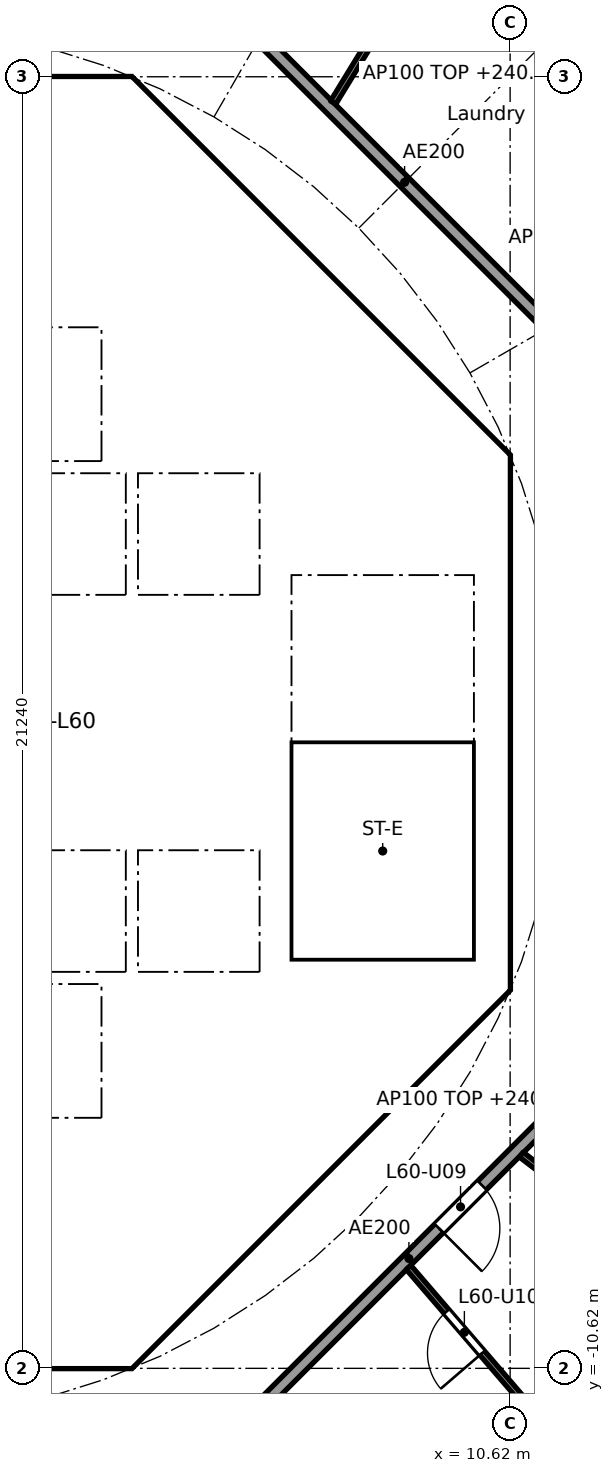
"""IFC4 building model, lengths in metres.
Left out: names, types, materials, properties, quantities, classifications, styles, units other than length and angle.
Written with IfcOpenShell. Run it as: python <this file> out.ifc"""

import sys

from ifc_helpers import new_model, si_unit, direction, frame, frame_2d, origin, place, context, subcontext, project, spatial, polyline, rectangle, outline, extrude, element, fill, save


model = new_model("IFC4")
c1 = context("Model", 3, precision=1e-05, world=origin(), true_north=direction((0.0, 1.0)))
c2 = subcontext(c1, "Body", "Model", "MODEL_VIEW")
j1 = project(units=[si_unit("LENGTHUNIT", "METRE"), si_unit("PLANEANGLEUNIT", "RADIAN")], contexts=[c1])
p1 = place(None, origin())
s1 = spatial("IfcSite", under=j1, at=p1, CompositionType="ELEMENT")
p2 = place(p1, origin())
s2 = spatial("IfcBuilding", under=s1, at=p2, CompositionType="ELEMENT")
p3 = place(p2, frame((0.0, 0.0, 238.1)))
s3 = spatial("IfcBuildingStorey", under=s2, at=p3, CompositionType="ELEMENT", Elevation=238.1)
p4 = place(p3, frame((9.988, 4.613, 0.0), z_axis=(0.0, 0.0, 1.0), x_axis=(-0.707106781187, 0.707106781187, 0.0)))
e1 = element("IfcWall", 1, at=p4, inside=s3, PredefinedType="SHEAR", context=c2, shape_type="SweptSolid", body=[
    extrude(rectangle(XDim=7.602, YDim=0.6, at=frame_2d((3.801, 0.0))), origin(), (0.0, 0.0, 1.0), 3.44),
])
p5 = place(p4, frame((3.201, 0.0, 0.0)))
e2 = element("IfcOpeningElement", 2, at=p5, cuts=e1, PredefinedType="OPENING", context=c2, shape_type="SweptSolid", body=[
    extrude(rectangle(XDim=1.2, YDim=2.1, at=frame_2d((0.6, 1.05))), frame((0.0, 0.31, 0.0), z_axis=(0.0, -1.0, 0.0), x_axis=(1.0, 0.0, 0.0)), (0.0, 0.0, 1.0), 0.62),
])
p6 = place(p3, frame((4.613, -9.988, 0.0), z_axis=(0.0, 0.0, 1.0), x_axis=(0.707106781187, 0.707106781187, 0.0)))
e3 = element("IfcWall", 3, at=p6, inside=s3, PredefinedType="SHEAR", context=c2, shape_type="SweptSolid", body=[
    extrude(rectangle(XDim=7.602, YDim=0.6, at=frame_2d((3.801, 0.0))), origin(), (0.0, 0.0, 1.0), 3.44),
])
p7 = place(p6, frame((3.201, 0.0, 0.0)))
e4 = element("IfcOpeningElement", 4, at=p7, cuts=e3, PredefinedType="OPENING", context=c2, shape_type="SweptSolid", body=[
    extrude(rectangle(XDim=1.2, YDim=2.1, at=frame_2d((0.6, 1.05))), frame((0.0, 0.31, 0.0), z_axis=(0.0, -1.0, 0.0), x_axis=(1.0, 0.0, 0.0)), (0.0, 0.0, 1.0), 0.62),
])
p8 = place(p3, frame((4.0, 4.3, 0.0), z_axis=(0.0, 0.0, 1.0), x_axis=(0.0, 1.0, 0.0)))
e5 = element("IfcWall", 5, at=p8, inside=s3, PredefinedType="SOLIDWALL", context=c2, shape_type="SweptSolid", body=[
    extrude(rectangle(XDim=2.2, YDim=0.2, at=frame_2d((1.1, 0.0))), origin(), (0.0, 0.0, 1.0), 3.44),
])
p9 = place(p8, frame((0.55, 0.0, 0.0)))
e6 = element("IfcOpeningElement", 6, at=p9, cuts=e5, PredefinedType="OPENING", context=c2, shape_type="SweptSolid", body=[
    extrude(rectangle(XDim=1.1, YDim=2.1, at=frame_2d((0.55, 1.05))), frame((0.0, 0.11, 0.0), z_axis=(0.0, -1.0, 0.0), x_axis=(1.0, 0.0, 0.0)), (0.0, 0.0, 1.0), 0.22),
])
p10 = place(p3, frame((-6.7, 2.0, 0.0), z_axis=(0.0, 0.0, 1.0), x_axis=(1.0, 0.0, 0.0)))
e7 = element("IfcWall", 7, at=p10, inside=s3, PredefinedType="SOLIDWALL", context=c2, shape_type="SweptSolid", body=[
    extrude(rectangle(XDim=13.4, YDim=0.2, at=frame_2d((6.7, 0.0))), origin(), (0.0, 0.0, 1.0), 3.44),
])
p11 = place(p10, frame((7.25, 0.0, 0.0)))
e8 = element("IfcOpeningElement", 8, at=p11, cuts=e7, PredefinedType="OPENING", context=c2, shape_type="SweptSolid", body=[
    extrude(rectangle(XDim=1.1, YDim=2.1, at=frame_2d((0.55, 1.05))), frame((0.0, 0.11, 0.0), z_axis=(0.0, -1.0, 0.0), x_axis=(1.0, 0.0, 0.0)), (0.0, 0.0, 1.0), 0.22),
])
p12 = place(p10, frame((9.45, 0.0, 0.0)))
e9 = element("IfcOpeningElement", 9, at=p12, cuts=e7, PredefinedType="OPENING", context=c2, shape_type="SweptSolid", body=[
    extrude(rectangle(XDim=1.1, YDim=2.1, at=frame_2d((0.55, 1.05))), frame((0.0, 0.11, 0.0), z_axis=(0.0, -1.0, 0.0), x_axis=(1.0, 0.0, 0.0)), (0.0, 0.0, 1.0), 0.22),
])
p13 = place(p10, frame((2.95, 0.0, 0.0)))
e10 = element("IfcOpeningElement", 10, at=p13, cuts=e7, PredefinedType="OPENING", context=c2, shape_type="SweptSolid", body=[
    extrude(rectangle(XDim=0.9, YDim=2.1, at=frame_2d((0.45, 1.05))), frame((0.0, 0.11, 0.0), z_axis=(0.0, -1.0, 0.0), x_axis=(1.0, 0.0, 0.0)), (0.0, 0.0, 1.0), 0.22),
])
p14 = place(p3, frame((6.7, 4.0, 0.0), z_axis=(0.0, 0.0, 1.0), x_axis=(1.0, 0.0, 0.0)))
e11 = element("IfcWall", 11, at=p14, inside=s3, PredefinedType="SOLIDWALL", context=c2, shape_type="SweptSolid", body=[
    extrude(rectangle(XDim=3.325, YDim=0.2, at=frame_2d((1.662, 0.0))), origin(), (0.0, 0.0, 1.0), 3.44),
])
p15 = place(p14, frame((1.25, 0.0, 0.0)))
e12 = element("IfcOpeningElement", 12, at=p15, cuts=e11, PredefinedType="OPENING", context=c2, shape_type="SweptSolid", body=[
    extrude(rectangle(XDim=1.1, YDim=2.1, at=frame_2d((0.55, 1.05))), frame((0.0, 0.11, 0.0), z_axis=(0.0, -1.0, 0.0), x_axis=(1.0, 0.0, 0.0)), (0.0, 0.0, 1.0), 0.22),
])
p16 = place(p3, frame((4.0, 7.025, 0.0), z_axis=(0.0, 0.0, 1.0), x_axis=(0.0, 1.0, 0.0)))
e13 = element("IfcWall", 13, at=p16, inside=s3, PredefinedType="SOLIDWALL", context=c2, shape_type="SweptSolid", body=[
    extrude(rectangle(XDim=3.0, YDim=0.2, at=frame_2d((1.5, 0.0))), origin(), (0.0, 0.0, 1.0), 3.44),
])
p17 = place(p16, frame((0.925, 0.0, 0.0)))
e14 = element("IfcOpeningElement", 14, at=p17, cuts=e13, PredefinedType="OPENING", context=c2, shape_type="SweptSolid", body=[
    extrude(rectangle(XDim=1.1, YDim=2.1, at=frame_2d((0.55, 1.05))), frame((0.0, 0.11, 0.0), z_axis=(0.0, -1.0, 0.0), x_axis=(1.0, 0.0, 0.0)), (0.0, 0.0, 1.0), 0.22),
])
p18 = place(p3, frame((4.0, -10.025, 0.0), z_axis=(0.0, 0.0, 1.0), x_axis=(0.0, 1.0, 0.0)))
e15 = element("IfcWall", 15, at=p18, inside=s3, PredefinedType="SOLIDWALL", context=c2, shape_type="SweptSolid", body=[
    extrude(rectangle(XDim=3.0, YDim=0.2, at=frame_2d((1.5, 0.0))), origin(), (0.0, 0.0, 1.0), 3.44),
])
p19 = place(p18, frame((0.975, 0.0, 0.0)))
e16 = element("IfcOpeningElement", 16, at=p19, cuts=e15, PredefinedType="OPENING", context=c2, shape_type="SweptSolid", body=[
    extrude(rectangle(XDim=1.1, YDim=2.1, at=frame_2d((0.55, 1.05))), frame((0.0, 0.11, 0.0), z_axis=(0.0, -1.0, 0.0), x_axis=(1.0, 0.0, 0.0)), (0.0, 0.0, 1.0), 0.22),
])
p20 = place(p3, frame((4.0, -6.5, 0.0), z_axis=(0.0, 0.0, 1.0), x_axis=(0.0, 1.0, 0.0)))
e17 = element("IfcWall", 17, at=p20, inside=s3, PredefinedType="SOLIDWALL", context=c2, shape_type="SweptSolid", body=[
    extrude(rectangle(XDim=2.2, YDim=0.2, at=frame_2d((1.1, 0.0))), origin(), (0.0, 0.0, 1.0), 3.44),
])
p21 = place(p20, frame((0.55, 0.0, 0.0)))
e18 = element("IfcOpeningElement", 18, at=p21, cuts=e17, PredefinedType="OPENING", context=c2, shape_type="SweptSolid", body=[
    extrude(rectangle(XDim=1.1, YDim=2.1, at=frame_2d((0.55, 1.05))), frame((0.0, 0.11, 0.0), z_axis=(0.0, -1.0, 0.0), x_axis=(1.0, 0.0, 0.0)), (0.0, 0.0, 1.0), 0.22),
])
p22 = place(p3, frame((-6.7, -2.0, 0.0), z_axis=(0.0, 0.0, 1.0), x_axis=(1.0, 0.0, 0.0)))
e19 = element("IfcWall", 19, at=p22, inside=s3, PredefinedType="SOLIDWALL", context=c2, shape_type="SweptSolid", body=[
    extrude(rectangle(XDim=13.4, YDim=0.2, at=frame_2d((6.7, 0.0))), origin(), (0.0, 0.0, 1.0), 3.44),
])
p23 = place(p22, frame((5.05, 0.0, 0.0)))
e20 = element("IfcOpeningElement", 20, at=p23, cuts=e19, PredefinedType="OPENING", context=c2, shape_type="SweptSolid", body=[
    extrude(rectangle(XDim=1.1, YDim=2.1, at=frame_2d((0.55, 1.05))), frame((0.0, 0.11, 0.0), z_axis=(0.0, -1.0, 0.0), x_axis=(1.0, 0.0, 0.0)), (0.0, 0.0, 1.0), 0.22),
])
p24 = place(p22, frame((7.25, 0.0, 0.0)))
e21 = element("IfcOpeningElement", 21, at=p24, cuts=e19, PredefinedType="OPENING", context=c2, shape_type="SweptSolid", body=[
    extrude(rectangle(XDim=1.1, YDim=2.1, at=frame_2d((0.55, 1.05))), frame((0.0, 0.11, 0.0), z_axis=(0.0, -1.0, 0.0), x_axis=(1.0, 0.0, 0.0)), (0.0, 0.0, 1.0), 0.22),
])
p25 = place(p22, frame((0.75, 0.0, 0.0)))
e22 = element("IfcOpeningElement", 22, at=p25, cuts=e19, PredefinedType="OPENING", context=c2, shape_type="SweptSolid", body=[
    extrude(rectangle(XDim=0.9, YDim=2.1, at=frame_2d((0.45, 1.05))), frame((0.0, 0.11, 0.0), z_axis=(0.0, -1.0, 0.0), x_axis=(1.0, 0.0, 0.0)), (0.0, 0.0, 1.0), 0.22),
])
p26 = place(p22, frame((2.95, 0.0, 0.0)))
e23 = element("IfcOpeningElement", 23, at=p26, cuts=e19, PredefinedType="OPENING", context=c2, shape_type="SweptSolid", body=[
    extrude(rectangle(XDim=0.9, YDim=2.1, at=frame_2d((0.45, 1.05))), frame((0.0, 0.11, 0.0), z_axis=(0.0, -1.0, 0.0), x_axis=(1.0, 0.0, 0.0)), (0.0, 0.0, 1.0), 0.22),
])
p27 = place(p3, origin())
e24 = element("IfcWall", 24, at=p27, inside=s3, PredefinedType="SHEAR", context=c2, shape_type="SweptSolid", body=[
    extrude(outline(polyline([(-4.152, -10.025), (4.152, -10.025), (4.401, -9.776), (4.825, -10.2), (4.401, -10.625), (-4.401, -10.625), (-4.825, -10.2), (-4.401, -9.776), (-4.152, -10.025)])), origin(), (0.0, 0.0, 1.0), 3.44),
])
p28 = place(p3, origin())
e25 = element("IfcWall", 25, at=p28, inside=s3, PredefinedType="SHEAR", context=c2, shape_type="SweptSolid", body=[
    extrude(outline(polyline([(-4.152, 10.025), (-4.401, 9.776), (-4.825, 10.2), (-4.401, 10.625), (4.401, 10.625), (4.825, 10.2), (4.401, 9.776), (4.152, 10.025), (-4.152, 10.025)])), origin(), (0.0, 0.0, 1.0), 3.44),
])
p29 = place(p3, origin())
e26 = element("IfcWall", 26, at=p29, inside=s3, PredefinedType="SHEAR", context=c2, shape_type="SweptSolid", body=[
    extrude(outline(polyline([(9.776, -4.401), (10.025, -4.152), (10.025, -3.801), (10.025, 4.152), (9.776, 4.401), (10.2, 4.825), (10.625, 4.401), (10.625, -4.401), (10.2, -4.825), (9.776, -4.401)])), origin(), (0.0, 0.0, 1.0), 3.44),
])
p30 = place(p3, origin())
e27 = element("IfcWall", 27, at=p30, inside=s3, PredefinedType="SOLIDWALL", context=c2, shape_type="SweptSolid", body=[
    extrude(outline(polyline([(-6.7, -2.1), (-6.5, -2.1), (-6.5, -4.1), (-4.5, -4.1), (-4.5, -2.1), (-4.3, -2.1), (-4.3, -4.1), (-2.3, -4.1), (-2.3, -2.1), (-2.1, -2.1), (-2.1, -4.1), (-0.1, -4.1), (-0.1, -2.1), (0.1, -2.1), (0.1, -4.1), (2.1, -4.1), (2.1, -2.1), (2.3, -2.1), (2.3, -4.1), (4.3, -4.1), (4.3, -2.1), (4.5, -2.1), (4.5, -4.1), (6.5, -4.1), (6.5, -2.1), (6.7, -2.1), (6.7, -4.3), (-6.7, -4.3), (-6.7, -2.1)])), origin(), (0.0, 0.0, 1.0), 3.44),
])
p31 = place(p3, origin())
e28 = element("IfcWall", 28, at=p31, inside=s3, PredefinedType="SOLIDWALL", context=c2, shape_type="SweptSolid", body=[
    extrude(outline(polyline([(-6.7, 4.3), (6.7, 4.3), (6.7, 2.1), (6.5, 2.1), (6.5, 4.1), (4.5, 4.1), (4.5, 2.1), (4.3, 2.1), (4.3, 4.1), (2.3, 4.1), (2.3, 2.1), (2.1, 2.1), (2.1, 4.1), (0.1, 4.1), (0.1, 2.1), (-0.1, 2.1), (-0.1, 4.1), (-6.5, 4.1), (-6.5, 2.1), (-6.7, 2.1), (-6.7, 4.3)])), origin(), (0.0, 0.0, 1.0), 3.44),
])
p32 = place(p3, origin())
e29 = element("IfcWall", 29, at=p32, inside=s3, PredefinedType="SOLIDWALL", context=c2, shape_type="SweptSolid", body=[
    extrude(outline(polyline([(4.1, -7.025), (-4.1, -7.025), (-4.1, -6.5), (4.1, -6.5), (4.1, -7.025)])), origin(), (0.0, 0.0, 1.0), 3.44),
])
p33 = place(p3, origin())
e30 = element("IfcWall", 30, at=p33, inside=s3, PredefinedType="SOLIDWALL", context=c2, shape_type="SweptSolid", body=[
    extrude(outline(polyline([(4.1, 6.5), (-4.1, 6.5), (-4.1, 7.025), (4.1, 7.025), (4.1, 6.5)])), origin(), (0.0, 0.0, 1.0), 3.44),
])
p34 = place(p3, origin())
e31 = element("IfcWall", 31, at=p34, inside=s3, PredefinedType="SOLIDWALL", context=c2, shape_type="SweptSolid", body=[
    extrude(outline(polyline([(7.025, -3.9), (6.7, -3.9), (6.7, 3.9), (7.025, 3.9), (7.025, -3.9)])), origin(), (0.0, 0.0, 1.0), 3.44),
])
p35 = place(p3, origin())
e32 = element("IfcWall", 32, at=p35, inside=s3, PredefinedType="SOLIDWALL", context=c2, shape_type="SweptSolid", body=[
    extrude(outline(polyline([(10.025, -4.1), (6.7, -4.1), (6.7, -3.9), (10.025, -3.9), (10.025, -4.1)])), origin(), (0.0, 0.0, 1.0), 3.44),
])
p36 = place(p3, frame((12.635, 5.134, 0.0), z_axis=(0.0, 0.0, 1.0), x_axis=(-0.707106781187, 0.707106781187, 0.0)))
e33 = element("IfcWall", 33, at=p36, inside=s3, PredefinedType="PARTITIONING", context=c2, shape_type="SweptSolid", body=[
    extrude(rectangle(XDim=10.609, YDim=0.2, at=frame_2d((5.305, 0.0))), origin(), (0.0, 0.0, 1.0), 3.44),
])
p37 = place(p3, frame((5.275, -12.494, 0.0), z_axis=(0.0, 0.0, 1.0), x_axis=(0.707106781187, 0.707106781187, 0.0)))
e34 = element("IfcWall", 34, at=p37, inside=s3, PredefinedType="PARTITIONING", context=c2, shape_type="SweptSolid", body=[
    extrude(rectangle(XDim=10.409, YDim=0.2, at=frame_2d((5.205, 0.0))), origin(), (0.0, 0.0, 1.0), 3.44),
])
p38 = place(p37, frame((5.906, 0.0, 0.0)))
e35 = element("IfcOpeningElement", 35, at=p38, cuts=e34, PredefinedType="OPENING", context=c2, shape_type="SweptSolid", body=[
    extrude(rectangle(XDim=1.0, YDim=2.1, at=frame_2d((0.5, 1.05))), frame((0.0, 0.11, 0.0), z_axis=(0.0, -1.0, 0.0), x_axis=(1.0, 0.0, 0.0)), (0.0, 0.0, 1.0), 0.22),
])
p39 = place(p3, frame((12.759, 10.443, 0.0), z_axis=(0.0, 0.0, 1.0), x_axis=(-0.642225196965, 0.766516011825, 0.0)))
e36 = element("IfcWall", 36, at=p39, inside=s3, PredefinedType="PARTITIONING", context=c2, shape_type="SweptSolid", body=[
    extrude(rectangle(XDim=4.361, YDim=0.1, at=frame_2d((2.18, 0.0))), origin(), (0.0, 0.0, 1.0), 2.837),
])
p40 = place(p39, frame((1.73, 0.0, 0.0)))
e37 = element("IfcOpeningElement", 37, at=p40, cuts=e36, PredefinedType="OPENING", context=c2, shape_type="SweptSolid", body=[
    extrude(rectangle(XDim=0.9, YDim=2.1, at=frame_2d((0.45, 1.05))), frame((0.0, 0.06, 0.0), z_axis=(0.0, -1.0, 0.0), x_axis=(1.0, 0.0, 0.0)), (0.0, 0.0, 1.0), 0.12),
])
p41 = place(p3, frame((7.71, 10.197, 0.0), z_axis=(0.0, 0.0, 1.0), x_axis=(0.521477621335, 0.853264959111, 0.0)))
e38 = element("IfcWall", 38, at=p41, inside=s3, PredefinedType="PARTITIONING", context=c2, shape_type="SweptSolid", body=[
    extrude(rectangle(XDim=8.941, YDim=0.1, at=frame_2d((4.471, 0.0))), origin(), (0.0, 0.0, 1.0), 2.762),
])
p42 = place(p41, frame((6.121, 0.0, 0.0)))
e39 = element("IfcOpeningElement", 39, at=p42, cuts=e38, PredefinedType="OPENING", context=c2, shape_type="SweptSolid", body=[
    extrude(rectangle(XDim=0.9, YDim=2.1, at=frame_2d((0.45, 1.05))), frame((0.0, 0.06, 0.0), z_axis=(0.0, -1.0, 0.0), x_axis=(1.0, 0.0, 0.0)), (0.0, 0.0, 1.0), 0.12),
])
p43 = place(p3, frame((8.95, -8.96, 0.0), z_axis=(0.0, 0.0, 1.0), x_axis=(0.652098047064, -0.758134643065, 0.0)))
e40 = element("IfcWall", 40, at=p43, inside=s3, PredefinedType="PARTITIONING", context=c2, shape_type="SweptSolid", body=[
    extrude(rectangle(XDim=5.874, YDim=0.1, at=frame_2d((2.937, 0.0))), origin(), (0.0, 0.0, 1.0), 2.762),
])
p44 = place(p43, frame((0.957, 0.0, 0.0)))
e41 = element("IfcOpeningElement", 41, at=p44, cuts=e40, PredefinedType="OPENING", context=c2, shape_type="SweptSolid", body=[
    extrude(rectangle(XDim=0.9, YDim=2.1, at=frame_2d((0.45, 1.05))), frame((0.0, 0.06, 0.0), z_axis=(0.0, -1.0, 0.0), x_axis=(1.0, 0.0, 0.0)), (0.0, 0.0, 1.0), 0.12),
])
p45 = place(p43, frame((3.894, 0.0, 0.0)))
e42 = element("IfcOpeningElement", 42, at=p45, cuts=e40, PredefinedType="OPENING", context=c2, shape_type="SweptSolid", body=[
    extrude(rectangle(XDim=0.9, YDim=2.1, at=frame_2d((0.45, 1.05))), frame((0.0, 0.06, 0.0), z_axis=(0.0, -1.0, 0.0), x_axis=(1.0, 0.0, 0.0)), (0.0, 0.0, 1.0), 0.12),
])
p46 = place(p3, frame((10.804, -7.105, 0.0), z_axis=(0.0, 0.0, 1.0), x_axis=(0.793311502848, -0.608815948747, 0.0)))
e43 = element("IfcWall", 43, at=p46, inside=s3, PredefinedType="PARTITIONING", context=c2, shape_type="SweptSolid", body=[
    extrude(rectangle(XDim=2.52, YDim=0.1, at=frame_2d((1.26, 0.0))), origin(), (0.0, 0.0, 1.0), 2.762),
])
p47 = place(p46, frame((0.81, 0.0, 0.0)))
e44 = element("IfcOpeningElement", 44, at=p47, cuts=e43, PredefinedType="OPENING", context=c2, shape_type="SweptSolid", body=[
    extrude(rectangle(XDim=0.9, YDim=2.1, at=frame_2d((0.45, 1.05))), frame((0.0, 0.06, 0.0), z_axis=(0.0, -1.0, 0.0), x_axis=(1.0, 0.0, 0.0)), (0.0, 0.0, 1.0), 0.12),
])
p48 = place(p12, origin())
e45 = element("IfcDoor", 45, at=p48, inside=s3, OperationType="DOUBLE_DOOR_SLIDING", PredefinedType="DOOR", context=c2, shape_type="SweptSolid", body=[
    extrude(rectangle(XDim=1.1, YDim=2.1, at=frame_2d((0.55, 1.05))), frame((0.0, 0.025, 0.0), z_axis=(0.0, -1.0, 0.0), x_axis=(1.0, 0.0, 0.0)), (0.0, 0.0, 1.0), 0.05),
])
fill(e9, e45)
p49 = place(p9, origin())
e46 = element("IfcDoor", 46, at=p49, inside=s3, OperationType="DOUBLE_DOOR_SLIDING", PredefinedType="DOOR", context=c2, shape_type="SweptSolid", body=[
    extrude(rectangle(XDim=1.1, YDim=2.1, at=frame_2d((0.55, 1.05))), frame((0.0, 0.025, 0.0), z_axis=(0.0, -1.0, 0.0), x_axis=(1.0, 0.0, 0.0)), (0.0, 0.0, 1.0), 0.05),
])
fill(e6, e46)
p50 = place(p21, origin())
e47 = element("IfcDoor", 47, at=p50, inside=s3, OperationType="DOUBLE_DOOR_SLIDING", PredefinedType="DOOR", context=c2, shape_type="SweptSolid", body=[
    extrude(rectangle(XDim=1.1, YDim=2.1, at=frame_2d((0.55, 1.05))), frame((0.0, 0.025, 0.0), z_axis=(0.0, -1.0, 0.0), x_axis=(1.0, 0.0, 0.0)), (0.0, 0.0, 1.0), 0.05),
])
fill(e18, e47)
p51 = place(p15, frame((1.1, 0.0, 0.0), x_axis=(-1.0, 0.0, 0.0)))
e48 = element("IfcDoor", 48, at=p51, inside=s3, OperationType="SINGLE_SWING_RIGHT", PredefinedType="DOOR", context=c2, shape_type="SweptSolid", body=[
    extrude(rectangle(XDim=1.1, YDim=2.1, at=frame_2d((0.55, 1.05))), frame((0.0, 0.025, 0.0), z_axis=(0.0, -1.0, 0.0), x_axis=(1.0, 0.0, 0.0)), (0.0, 0.0, 1.0), 0.05),
])
fill(e12, e48)
p52 = place(p17, origin())
e49 = element("IfcDoor", 49, at=p52, inside=s3, OperationType="SINGLE_SWING_LEFT", PredefinedType="DOOR", context=c2, shape_type="SweptSolid", body=[
    extrude(rectangle(XDim=1.1, YDim=2.1, at=frame_2d((0.55, 1.05))), frame((0.0, 0.025, 0.0), z_axis=(0.0, -1.0, 0.0), x_axis=(1.0, 0.0, 0.0)), (0.0, 0.0, 1.0), 0.05),
])
fill(e14, e49)
p53 = place(p19, origin())
e50 = element("IfcDoor", 50, at=p53, inside=s3, OperationType="SINGLE_SWING_RIGHT", PredefinedType="DOOR", context=c2, shape_type="SweptSolid", body=[
    extrude(rectangle(XDim=1.1, YDim=2.1, at=frame_2d((0.55, 1.05))), frame((0.0, 0.025, 0.0), z_axis=(0.0, -1.0, 0.0), x_axis=(1.0, 0.0, 0.0)), (0.0, 0.0, 1.0), 0.05),
])
fill(e16, e50)
p54 = place(p5, origin())
e51 = element("IfcDoor", 51, at=p54, inside=s3, OperationType="SINGLE_SWING_LEFT", PredefinedType="DOOR", context=c2, shape_type="SweptSolid", body=[
    extrude(rectangle(XDim=1.2, YDim=2.1, at=frame_2d((0.6, 1.05))), frame((0.0, 0.025, 0.0), z_axis=(0.0, -1.0, 0.0), x_axis=(1.0, 0.0, 0.0)), (0.0, 0.0, 1.0), 0.05),
])
fill(e2, e51)
p55 = place(p7, origin())
e52 = element("IfcDoor", 52, at=p55, inside=s3, OperationType="SINGLE_SWING_LEFT", PredefinedType="DOOR", context=c2, shape_type="SweptSolid", body=[
    extrude(rectangle(XDim=1.2, YDim=2.1, at=frame_2d((0.6, 1.05))), frame((0.0, 0.025, 0.0), z_axis=(0.0, -1.0, 0.0), x_axis=(1.0, 0.0, 0.0)), (0.0, 0.0, 1.0), 0.05),
])
fill(e4, e52)
p56 = place(p38, frame((1.0, 0.0, 0.0), x_axis=(-1.0, 0.0, 0.0)))
e53 = element("IfcDoor", 53, at=p56, inside=s3, OperationType="SINGLE_SWING_RIGHT", PredefinedType="DOOR", context=c2, shape_type="SweptSolid", body=[
    extrude(rectangle(XDim=1.0, YDim=2.1, at=frame_2d((0.5, 1.05))), frame((0.0, 0.025, 0.0), z_axis=(0.0, -1.0, 0.0), x_axis=(1.0, 0.0, 0.0)), (0.0, 0.0, 1.0), 0.05),
])
fill(e35, e53)
p57 = place(p44, frame((0.9, 0.0, 0.0), x_axis=(-1.0, 0.0, 0.0)))
e54 = element("IfcDoor", 54, at=p57, inside=s3, OperationType="SINGLE_SWING_LEFT", PredefinedType="DOOR", context=c2, shape_type="SweptSolid", body=[
    extrude(rectangle(XDim=0.9, YDim=2.1, at=frame_2d((0.45, 1.05))), frame((0.0, 0.025, 0.0), z_axis=(0.0, -1.0, 0.0), x_axis=(1.0, 0.0, 0.0)), (0.0, 0.0, 1.0), 0.05),
])
fill(e41, e54)
save(model, sys.argv[1])
